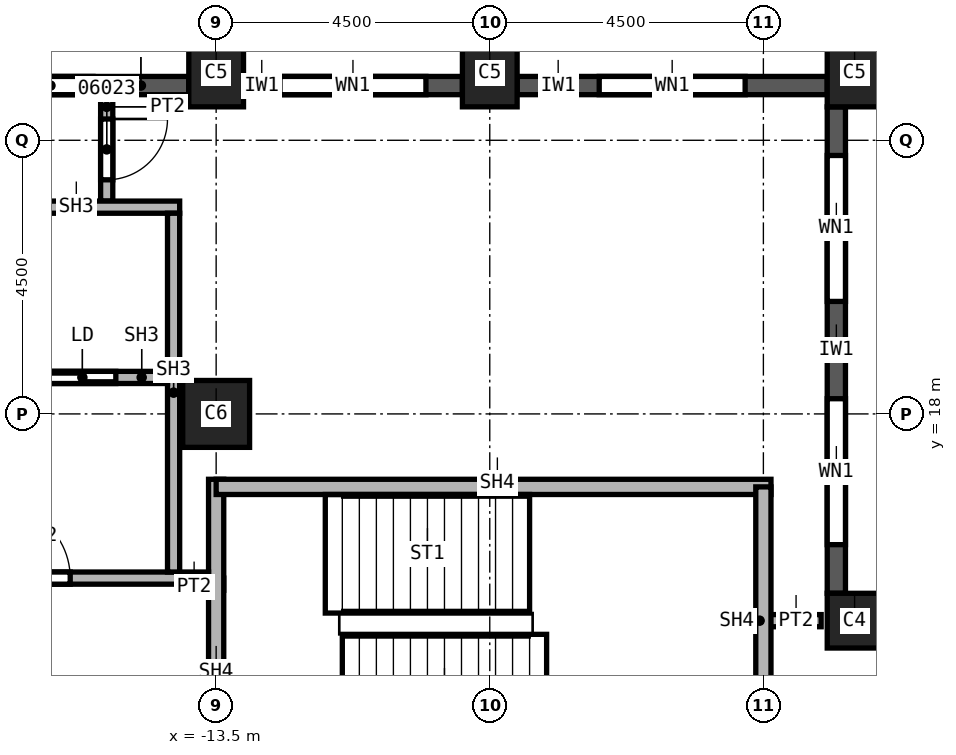
"""IFC4 building model, lengths in metres.
Left out: names, types, materials, properties, quantities, classifications, styles, units other than length and angle.
Written with IfcOpenShell. Run it as: python <this file> out.ifc"""

import sys

from ifc_helpers import new_model, si_unit, direction, frame, frame_2d, origin, origin_2d, place, context, subcontext, project, spatial, rectangle, extrude, element, fill, save


model = new_model("IFC4")
c1 = context("Model", 3, precision=1e-05, world=origin(), true_north=direction((0.0, 1.0)))
c2 = subcontext(c1, "Body", "Model", "MODEL_VIEW")
j1 = project(units=[si_unit("LENGTHUNIT", "METRE"), si_unit("PLANEANGLEUNIT", "RADIAN")], contexts=[c1])
p1 = place(None, origin())
s1 = spatial("IfcSite", under=j1, at=p1, CompositionType="ELEMENT")
p2 = place(p1, origin())
s2 = spatial("IfcBuilding", under=s1, at=p2, CompositionType="ELEMENT")
p3 = place(p2, frame((0.0, 0.0, 130.0)))
s3 = spatial("IfcBuildingStorey", under=s2, at=p3, CompositionType="ELEMENT", Elevation=130.0)
p4 = place(p3, frame((-13.5, 18.0, 0.0), z_axis=(0.0, 0.0, 1.0), x_axis=(1.0, 0.0, 0.0)))
e1 = element("IfcColumn", 1, at=p4, inside=s3, PredefinedType="COLUMN", context=c2, shape_type="SweptSolid", body=[
    extrude(rectangle(XDim=1.1, YDim=1.1, at=origin_2d()), origin(), (0.0, 0.0, 1.0), 3.7),
])
for number, where, z_axis, x_axis in (
    (2, (-3.0, 23.6, 0.0), (0.0, 0.0, 1.0), (1.0, 0.0, 0.0)),
    (3, (-9.0, 23.6, 0.0), (0.0, 0.0, 1.0), (1.0, 0.0, 0.0)),
    (4, (-13.5, 23.6, 0.0), (0.0, 0.0, 1.0), (1.0, 0.0, 0.0)),
):
    element("IfcColumn", number, at=place(p3, frame(where, z_axis=z_axis, x_axis=x_axis)), inside=s3, PredefinedType="COLUMN", context=c2, shape_type="SweptSolid", body=[
        extrude(rectangle(XDim=0.9, YDim=1.1, at=origin_2d()), origin(), (0.0, 0.0, 1.0), 3.7),
    ])
p5 = place(p3, frame((-3.0, 14.6, 0.0), z_axis=(0.0, 0.0, 1.0), x_axis=(1.0, 0.0, 0.0)))
e5 = element("IfcColumn", 5, at=p5, inside=s3, PredefinedType="COLUMN", context=c2, shape_type="SweptSolid", body=[
    extrude(rectangle(XDim=0.9, YDim=0.9, at=origin_2d()), origin(), (0.0, 0.0, 1.0), 3.7),
])
p6 = place(p3, frame((-3.3, 15.05, 0.0), z_axis=(0.0, 0.0, 1.0), x_axis=(0.0, 1.0, 0.0)))
e6 = element("IfcWall", 6, at=p6, inside=s3, PredefinedType="SOLIDWALL", context=c2, shape_type="SweptSolid", body=[
    extrude(rectangle(XDim=8.0, YDim=0.3, at=frame_2d((4.0, 0.0))), origin(), (0.0, 0.0, 1.0), 3.1),
])
p7 = place(p6, frame((0.8, 0.0, 0.8)))
e7 = element("IfcOpeningElement", 7, at=p7, cuts=e6, PredefinedType="OPENING", context=c2, shape_type="SweptSolid", body=[
    extrude(rectangle(XDim=2.4, YDim=1.95, at=frame_2d((1.2, 0.975))), frame((0.0, 0.15, 0.0), z_axis=(0.0, -1.0, 0.0), x_axis=(1.0, 0.0, 0.0)), (0.0, 0.0, 1.0), 0.3),
])
p8 = place(p6, frame((4.8, 0.0, 0.8)))
e8 = element("IfcOpeningElement", 8, at=p8, cuts=e6, PredefinedType="OPENING", context=c2, shape_type="SweptSolid", body=[
    extrude(rectangle(XDim=2.4, YDim=1.95, at=frame_2d((1.2, 0.975))), frame((0.0, 0.15, 0.0), z_axis=(0.0, -1.0, 0.0), x_axis=(1.0, 0.0, 0.0)), (0.0, 0.0, 1.0), 0.3),
])
p9 = place(p3, frame((-3.45, 23.4, 0.0), z_axis=(0.0, 0.0, 1.0), x_axis=(-1.0, 0.0, 0.0)))
e9 = element("IfcWall", 9, at=p9, inside=s3, PredefinedType="SOLIDWALL", context=c2, shape_type="SweptSolid", body=[
    extrude(rectangle(XDim=5.1, YDim=0.3, at=frame_2d((2.55, 0.0))), origin(), (0.0, 0.0, 1.0), 3.1),
])
p10 = place(p9, frame((1.35, 0.0, 0.8)))
e10 = element("IfcOpeningElement", 10, at=p10, cuts=e9, PredefinedType="OPENING", context=c2, shape_type="SweptSolid", body=[
    extrude(rectangle(XDim=2.4, YDim=1.95, at=frame_2d((1.2, 0.975))), frame((0.0, 0.15, 0.0), z_axis=(0.0, -1.0, 0.0), x_axis=(1.0, 0.0, 0.0)), (0.0, 0.0, 1.0), 0.3),
])
p11 = place(p3, frame((-9.45, 23.4, 0.0), z_axis=(0.0, 0.0, 1.0), x_axis=(-1.0, 0.0, 0.0)))
e11 = element("IfcWall", 11, at=p11, inside=s3, PredefinedType="SOLIDWALL", context=c2, shape_type="SweptSolid", body=[
    extrude(rectangle(XDim=3.6, YDim=0.3, at=frame_2d((1.8, 0.0))), origin(), (0.0, 0.0, 1.0), 3.1),
])
p12 = place(p11, frame((0.6, 0.0, 0.8)))
e12 = element("IfcOpeningElement", 12, at=p12, cuts=e11, PredefinedType="OPENING", context=c2, shape_type="SweptSolid", body=[
    extrude(rectangle(XDim=2.4, YDim=1.95, at=frame_2d((1.2, 0.975))), frame((0.0, 0.15, 0.0), z_axis=(0.0, -1.0, 0.0), x_axis=(1.0, 0.0, 0.0)), (0.0, 0.0, 1.0), 0.3),
])
p13 = place(p3, frame((-13.95, 23.4, 0.0), z_axis=(0.0, 0.0, 1.0), x_axis=(-1.0, 0.0, 0.0)))
e13 = element("IfcWall", 13, at=p13, inside=s3, PredefinedType="SOLIDWALL", context=c2, shape_type="SweptSolid", body=[
    extrude(rectangle(XDim=3.6, YDim=0.3, at=frame_2d((1.8, 0.0))), origin(), (0.0, 0.0, 1.0), 3.1),
])
p14 = place(p13, frame((1.575, 0.0, 0.8)))
e14 = element("IfcOpeningElement", 14, at=p14, cuts=e13, PredefinedType="OPENING", context=c2, shape_type="SweptSolid", body=[
    extrude(rectangle(XDim=1.4, YDim=1.95, at=frame_2d((0.7, 0.975))), frame((0.0, 0.15, 0.0), z_axis=(0.0, -1.0, 0.0), x_axis=(1.0, 0.0, 0.0)), (0.0, 0.0, 1.0), 0.3),
])
p15 = place(p3, frame((-15.3, 23.25, 0.0), z_axis=(0.0, 0.0, 1.0), x_axis=(0.0, -1.0, 0.0)))
e15 = element("IfcWall", 15, at=p15, inside=s3, PredefinedType="PARTITIONING", context=c2, shape_type="SweptSolid", body=[
    extrude(rectangle(XDim=1.75, YDim=0.2, at=frame_2d((0.875, 0.0))), origin(), (0.0, 0.0, 1.0), 3.7),
])
p16 = place(p15, frame((0.4, 0.0, 0.0)))
e16 = element("IfcOpeningElement", 16, at=p16, cuts=e15, PredefinedType="OPENING", context=c2, shape_type="SweptSolid", body=[
    extrude(rectangle(XDim=1.0, YDim=2.1, at=frame_2d((0.5, 1.05))), frame((0.0, 0.1, 0.0), z_axis=(0.0, -1.0, 0.0), x_axis=(1.0, 0.0, 0.0)), (0.0, 0.0, 1.0), 0.2),
])
p17 = place(p3, frame((-14.1, 15.2, 0.0), z_axis=(0.0, 0.0, 1.0), x_axis=(1.0, 0.0, 0.0)))
e17 = element("IfcWall", 17, at=p17, inside=s3, PredefinedType="PARTITIONING", context=c2, shape_type="SweptSolid", body=[
    extrude(rectangle(XDim=0.725, YDim=0.2, at=frame_2d((0.363, 0.0))), origin(), (0.0, 0.0, 1.0), 3.7),
])
p18 = place(p3, frame((-4.5, 14.6, 0.0), z_axis=(0.0, 0.0, 1.0), x_axis=(1.0, 0.0, 0.0)))
e18 = element("IfcWall", 18, at=p18, inside=s3, PredefinedType="PARTITIONING", context=c2, shape_type="SweptSolid", body=[
    extrude(rectangle(XDim=0.95, YDim=0.2, at=frame_2d((0.475, 0.0))), origin(), (0.0, 0.0, 1.0), 3.7),
])
p19 = place(p3, frame((-13.5, 12.175, 0.0), z_axis=(0.0, 0.0, 1.0), x_axis=(0.0, 1.0, 0.0)))
e19 = element("IfcWall", 19, at=p19, inside=s3, PredefinedType="SOLIDWALL", context=c2, shape_type="SweptSolid", body=[
    extrude(rectangle(XDim=4.75, YDim=0.25, at=frame_2d((2.375, 0.0))), origin(), (0.0, 0.0, 1.0), 3.7),
])
p20 = place(p3, frame((-13.5, 16.8, 0.0), z_axis=(0.0, 0.0, 1.0), x_axis=(1.0, 0.0, 0.0)))
e20 = element("IfcWall", 20, at=p20, inside=s3, PredefinedType="SOLIDWALL", context=c2, shape_type="SweptSolid", body=[
    extrude(rectangle(XDim=9.125, YDim=0.25, at=frame_2d((4.562, 0.0))), origin(), (0.0, 0.0, 1.0), 3.7),
])
p21 = place(p3, frame((-4.5, 16.8, 0.0), z_axis=(0.0, 0.0, 1.0), x_axis=(0.0, -1.0, 0.0)))
e21 = element("IfcWall", 21, at=p21, inside=s3, PredefinedType="SOLIDWALL", context=c2, shape_type="SweptSolid", body=[
    extrude(rectangle(XDim=4.5, YDim=0.25, at=frame_2d((2.25, 0.0))), origin(), (0.0, 0.0, 1.0), 3.7),
])
p22 = place(p3, frame((-21.9, 15.3, 0.0), z_axis=(0.0, 0.0, 1.0), x_axis=(1.0, 0.0, 0.0)))
e22 = element("IfcWall", 22, at=p22, inside=s3, PredefinedType="SOLIDWALL", context=c2, shape_type="SweptSolid", body=[
    extrude(rectangle(XDim=8.275, YDim=0.2, at=frame_2d((4.137, 0.0))), origin(), (0.0, 0.0, 1.0), 3.7),
])
p23 = place(p22, frame((4.8, 0.0, 0.0)))
e23 = element("IfcOpeningElement", 23, at=p23, cuts=e22, PredefinedType="OPENING", context=c2, shape_type="SweptSolid", body=[
    extrude(rectangle(XDim=1.2, YDim=2.1, at=frame_2d((0.6, 1.05))), frame((0.0, 0.1, 0.0), z_axis=(0.0, -1.0, 0.0), x_axis=(1.0, 0.0, 0.0)), (0.0, 0.0, 1.0), 0.2),
])
p24 = place(p3, frame((-21.9, 21.4, 0.0), z_axis=(0.0, 0.0, 1.0), x_axis=(1.0, 0.0, 0.0)))
e24 = element("IfcWall", 24, at=p24, inside=s3, PredefinedType="SOLIDWALL", context=c2, shape_type="SweptSolid", body=[
    extrude(rectangle(XDim=7.8, YDim=0.2, at=frame_2d((3.9, 0.0))), origin(), (0.0, 0.0, 1.0), 3.7),
])
p25 = place(p24, frame((3.2, 0.0, 0.0)))
e25 = element("IfcOpeningElement", 25, at=p25, cuts=e24, PredefinedType="OPENING", context=c2, shape_type="SweptSolid", body=[
    extrude(rectangle(XDim=1.2, YDim=2.1, at=frame_2d((0.6, 1.05))), frame((0.0, 0.1, 0.0), z_axis=(0.0, -1.0, 0.0), x_axis=(1.0, 0.0, 0.0)), (0.0, 0.0, 1.0), 0.2),
])
p26 = place(p3, frame((-14.2, 15.4, 0.0), z_axis=(0.0, 0.0, 1.0), x_axis=(0.0, 1.0, 0.0)))
e26 = element("IfcWall", 26, at=p26, inside=s3, PredefinedType="SOLIDWALL", context=c2, shape_type="SweptSolid", body=[
    extrude(rectangle(XDim=5.9, YDim=0.2, at=frame_2d((2.95, 0.0))), origin(), (0.0, 0.0, 1.0), 3.7),
])
p27 = place(p3, frame((-17.1, 18.6, 0.0), z_axis=(0.0, 0.0, 1.0), x_axis=(1.0, 0.0, 0.0)))
e27 = element("IfcWall", 27, at=p27, inside=s3, PredefinedType="SOLIDWALL", context=c2, shape_type="SweptSolid", body=[
    extrude(rectangle(XDim=2.8, YDim=0.2, at=frame_2d((1.4, 0.0))), origin(), (0.0, 0.0, 1.0), 3.7),
])
p28 = place(p27, frame((0.85, 0.0, 0.0)))
e28 = element("IfcOpeningElement", 28, at=p28, cuts=e27, PredefinedType="OPENING", context=c2, shape_type="SweptSolid", body=[
    extrude(rectangle(XDim=1.1, YDim=2.1, at=frame_2d((0.55, 1.05))), frame((0.0, 0.1, 0.0), z_axis=(0.0, -1.0, 0.0), x_axis=(1.0, 0.0, 0.0)), (0.0, 0.0, 1.0), 0.2),
])
p29 = place(p7, origin())
e29 = element("IfcWindow", 29, at=p29, inside=s3, PartitioningType="SINGLE_PANEL", PredefinedType="WINDOW", context=c2, shape_type="SweptSolid", body=[
    extrude(rectangle(XDim=2.4, YDim=1.95, at=frame_2d((1.2, 0.975))), frame((0.0, 0.03, 0.0), z_axis=(0.0, -1.0, 0.0), x_axis=(1.0, 0.0, 0.0)), (0.0, 0.0, 1.0), 0.06),
])
fill(e7, e29)
p30 = place(p8, origin())
e30 = element("IfcWindow", 30, at=p30, inside=s3, PartitioningType="SINGLE_PANEL", PredefinedType="WINDOW", context=c2, shape_type="SweptSolid", body=[
    extrude(rectangle(XDim=2.4, YDim=1.95, at=frame_2d((1.2, 0.975))), frame((0.0, 0.03, 0.0), z_axis=(0.0, -1.0, 0.0), x_axis=(1.0, 0.0, 0.0)), (0.0, 0.0, 1.0), 0.06),
])
fill(e8, e30)
p31 = place(p10, origin())
e31 = element("IfcWindow", 31, at=p31, inside=s3, PartitioningType="SINGLE_PANEL", PredefinedType="WINDOW", context=c2, shape_type="SweptSolid", body=[
    extrude(rectangle(XDim=2.4, YDim=1.95, at=frame_2d((1.2, 0.975))), frame((0.0, 0.03, 0.0), z_axis=(0.0, -1.0, 0.0), x_axis=(1.0, 0.0, 0.0)), (0.0, 0.0, 1.0), 0.06),
])
fill(e10, e31)
p32 = place(p12, origin())
e32 = element("IfcWindow", 32, at=p32, inside=s3, PartitioningType="SINGLE_PANEL", PredefinedType="WINDOW", context=c2, shape_type="SweptSolid", body=[
    extrude(rectangle(XDim=2.4, YDim=1.95, at=frame_2d((1.2, 0.975))), frame((0.0, 0.03, 0.0), z_axis=(0.0, -1.0, 0.0), x_axis=(1.0, 0.0, 0.0)), (0.0, 0.0, 1.0), 0.06),
])
fill(e12, e32)
p33 = place(p16, origin())
e33 = element("IfcDoor", 33, at=p33, inside=s3, OperationType="SINGLE_SWING_RIGHT", PredefinedType="DOOR", context=c2, shape_type="SweptSolid", body=[
    extrude(rectangle(XDim=1.0, YDim=2.1, at=frame_2d((0.5, 1.05))), frame((0.0, 0.025, 0.0), z_axis=(0.0, -1.0, 0.0), x_axis=(1.0, 0.0, 0.0)), (0.0, 0.0, 1.0), 0.05),
])
fill(e16, e33)
p34 = place(p28, origin())
e34 = element("IfcDoor", 34, at=p34, inside=s3, OperationType="SLIDING_TO_LEFT", PredefinedType="DOOR", context=c2, shape_type="SweptSolid", body=[
    extrude(rectangle(XDim=1.1, YDim=2.1, at=frame_2d((0.55, 1.05))), frame((0.0, 0.025, 0.0), z_axis=(0.0, -1.0, 0.0), x_axis=(1.0, 0.0, 0.0)), (0.0, 0.0, 1.0), 0.05),
])
fill(e28, e34)
p35 = place(p23, origin())
e35 = element("IfcDoor", 35, at=p35, inside=s3, OperationType="SINGLE_SWING_RIGHT", PredefinedType="DOOR", context=c2, shape_type="SweptSolid", body=[
    extrude(rectangle(XDim=1.2, YDim=2.1, at=frame_2d((0.6, 1.05))), frame((0.0, 0.025, 0.0), z_axis=(0.0, -1.0, 0.0), x_axis=(1.0, 0.0, 0.0)), (0.0, 0.0, 1.0), 0.05),
])
fill(e23, e35)
p36 = place(p14, origin())
e36 = element("IfcWindow", 36, at=p36, inside=s3, PartitioningType="SINGLE_PANEL", PredefinedType="WINDOW", context=c2, shape_type="SweptSolid", body=[
    extrude(rectangle(XDim=1.4, YDim=1.95, at=frame_2d((0.7, 0.975))), frame((0.0, 0.03, 0.0), z_axis=(0.0, -1.0, 0.0), x_axis=(1.0, 0.0, 0.0)), (0.0, 0.0, 1.0), 0.06),
])
fill(e14, e36)
save(model, sys.argv[1])
